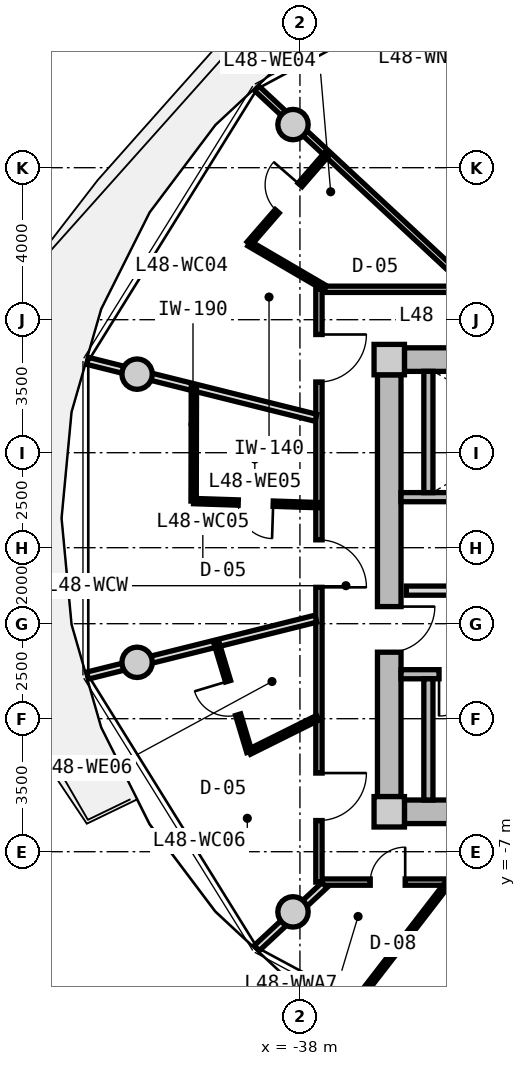
"""IFC4 building model, lengths in metres.
Left out: names, types, materials, properties, quantities, classifications, styles, units other than length and angle.
Written with IfcOpenShell. Run it as: python <this file> out.ifc"""

import sys

from ifc_helpers import new_model, si_unit, direction, frame, frame_2d, origin, origin_2d, place, context, subcontext, project, spatial, rectangle, circle, extrude, source, transform, mapped, element, fill, save


model = new_model("IFC4")
c1 = context("Model", 3, precision=1e-05, world=origin(), true_north=direction((0.0, 1.0)))
c2 = subcontext(c1, "Body", "Model", "MODEL_VIEW")
j1 = project(units=[si_unit("LENGTHUNIT", "METRE"), si_unit("PLANEANGLEUNIT", "RADIAN")], contexts=[c1])
p1 = place(None, origin())
s1 = spatial("IfcSite", under=j1, at=p1, CompositionType="ELEMENT")
p2 = place(p1, origin())
s2 = spatial("IfcBuilding", under=s1, at=p2, CompositionType="ELEMENT")
p3 = place(p2, frame((0.0, 0.0, 155.65)))
s3 = spatial("IfcBuildingStorey", under=s2, at=p3, CompositionType="ELEMENT", Elevation=155.65)
m1 = source(origin(), c2, "Body", "SweptSolid", [
    extrude(rectangle(XDim=0.8, YDim=0.8, at=origin_2d()), origin(), (0.0, 0.0, 1.0), 3.05),
])
for number, where, z_axis, x_axis in (
    (1, (-35.65, -5.95, 0.0), (0.0, 0.0, 1.0), (1.0, 0.0, 0.0)),
    (2, (-35.65, 5.95, 0.0), (0.0, 0.0, 1.0), (1.0, 0.0, 0.0)),
):
    element("IfcColumn", number, at=place(p3, frame(where, z_axis=z_axis, x_axis=x_axis)), inside=s3, PredefinedType="COLUMN", context=c2, shape_type="MappedRepresentation", body=[
        mapped(m1, transform((0.0, 0.0, 0.0), x_axis=(1.0, 0.0, 0.0), y_axis=(0.0, 1.0, 0.0), z_axis=(0.0, 0.0, 1.0), scale=1.0)),
    ])
m2 = source(origin(), c2, "Body", "SweptSolid", [
    extrude(rectangle(XDim=14.5, YDim=0.62, at=frame_2d((7.25, 0.0))), origin(), (0.0, 0.0, 1.0), 2.81),
])
for number, where, z_axis, x_axis in (
    (3, (-35.25, 5.95, 0.0), (0.0, 0.0, 1.0), (1.0, 0.0, 0.0)),
    (4, (-20.75, -5.95, 0.0), (0.0, 0.0, 1.0), (-1.0, 0.0, 0.0)),
):
    element("IfcWall", number, at=place(p3, frame(where, z_axis=z_axis, x_axis=x_axis)), inside=s3, PredefinedType="SHEAR", context=c2, shape_type="MappedRepresentation", body=[
        mapped(m2, transform((0.0, 0.0, 0.0), x_axis=(1.0, 0.0, 0.0), y_axis=(0.0, 1.0, 0.0), z_axis=(0.0, 0.0, 1.0), scale=1.0)),
    ])
m3 = source(origin(), c2, "Body", "SweptSolid", [
    extrude(rectangle(XDim=11.1, YDim=0.62, at=frame_2d((5.55, 0.0))), origin(), (0.0, 0.0, 1.0), 2.81),
])
p4 = place(p3, frame((-35.65, -5.55, 0.0), z_axis=(0.0, 0.0, 1.0), x_axis=(0.0, 1.0, 0.0)))
e5 = element("IfcWall", 5, at=p4, inside=s3, PredefinedType="SHEAR", context=c2, shape_type="MappedRepresentation", body=[
    mapped(m3, transform((0.0, 0.0, 0.0), x_axis=(1.0, 0.0, 0.0), y_axis=(0.0, 1.0, 0.0), z_axis=(0.0, 0.0, 1.0), scale=1.0)),
])
p5 = place(p4, frame((3.8, 0.0, 0.0)))
e6 = element("IfcOpeningElement", 6, at=p5, cuts=e5, PredefinedType="OPENING", context=c2, shape_type="SweptSolid", body=[
    extrude(rectangle(XDim=1.2, YDim=2.15, at=frame_2d((0.6, 1.075))), frame((0.0, 0.32, 0.0), z_axis=(0.0, -1.0, 0.0), x_axis=(1.0, 0.0, 0.0)), (0.0, 0.0, 1.0), 0.64),
])
m4 = source(origin(), c2, "Body", "SweptSolid", [
    extrude(circle(Radius=0.4, at=origin_2d()), origin(), (0.0, 0.0, 1.0), 3.05),
])
for number, where, z_axis, x_axis in (
    (7, (-38.183, 12.135, 0.0), (0.0, 0.0, 1.0), (1.0, 0.0, 0.0)),
    (8, (-42.285, 5.567, 0.0), (0.0, 0.0, 1.0), (1.0, 0.0, 0.0)),
    (9, (-42.285, -2.016, 0.0), (0.0, 0.0, 1.0), (1.0, 0.0, 0.0)),
    (10, (-38.183, -8.584, 0.0), (0.0, 0.0, 1.0), (1.0, 0.0, 0.0)),
):
    element("IfcColumn", number, at=place(p3, frame(where, z_axis=z_axis, x_axis=x_axis)), inside=s3, PredefinedType="COLUMN", context=c2, shape_type="MappedRepresentation", body=[
        mapped(m4, transform((0.0, 0.0, 0.0), x_axis=(1.0, 0.0, 0.0), y_axis=(0.0, 1.0, 0.0), z_axis=(0.0, 0.0, 1.0), scale=1.0)),
    ])
m5 = source(origin(), c2, "Body", "SweptSolid", [
    extrude(rectangle(XDim=7.88, YDim=0.24, at=frame_2d((3.94, 0.0))), origin(), (0.0, 0.0, 1.0), 2.81),
])
p6 = place(p3, frame((-35.34, 2.33, 0.0), z_axis=(0.0, 0.0, 1.0), x_axis=(1.0, 0.0, 0.0)))
e11 = element("IfcWall", 11, at=p6, inside=s3, PredefinedType="PARTITIONING", context=c2, shape_type="MappedRepresentation", body=[
    mapped(m5, transform((0.0, 0.0, 0.0), x_axis=(1.0, 0.0, 0.0), y_axis=(0.0, 1.0, 0.0), z_axis=(0.0, 0.0, 1.0), scale=1.0)),
])
m6 = source(origin(), c2, "Body", "SweptSolid", [
    extrude(rectangle(XDim=3.19, YDim=0.24, at=frame_2d((1.595, 0.0))), origin(), (0.0, 0.0, 1.0), 2.81),
])
p7 = place(p3, frame((-34.62, 2.45, 0.0), z_axis=(0.0, 0.0, 1.0), x_axis=(0.0, 1.0, 0.0)))
e12 = element("IfcWall", 12, at=p7, inside=s3, PredefinedType="PARTITIONING", context=c2, shape_type="MappedRepresentation", body=[
    mapped(m6, transform((0.0, 0.0, 0.0), x_axis=(1.0, 0.0, 0.0), y_axis=(0.0, 1.0, 0.0), z_axis=(0.0, 0.0, 1.0), scale=1.0)),
])
p8 = place(p3, frame((-35.34, -2.33, 0.0), z_axis=(0.0, 0.0, 1.0), x_axis=(1.0, 0.0, 0.0)))
e13 = element("IfcWall", 13, at=p8, inside=s3, PredefinedType="PARTITIONING", context=c2, shape_type="MappedRepresentation", body=[
    mapped(m5, transform((0.0, 0.0, 0.0), x_axis=(1.0, 0.0, 0.0), y_axis=(0.0, 1.0, 0.0), z_axis=(0.0, 0.0, 1.0), scale=1.0)),
])
p9 = place(p8, frame((1.0, 0.0, 0.0)))
e14 = element("IfcOpeningElement", 14, at=p9, cuts=e13, PredefinedType="OPENING", context=c2, shape_type="SweptSolid", body=[
    extrude(rectangle(XDim=1.1, YDim=2.15, at=frame_2d((0.55, 1.075))), frame((0.0, 0.13, 0.0), z_axis=(0.0, -1.0, 0.0), x_axis=(1.0, 0.0, 0.0)), (0.0, 0.0, 1.0), 0.26),
])
p10 = place(p3, frame((-34.62, -5.64, 0.0), z_axis=(0.0, 0.0, 1.0), x_axis=(0.0, 1.0, 0.0)))
e15 = element("IfcWall", 15, at=p10, inside=s3, PredefinedType="PARTITIONING", context=c2, shape_type="MappedRepresentation", body=[
    mapped(m6, transform((0.0, 0.0, 0.0), x_axis=(1.0, 0.0, 0.0), y_axis=(0.0, 1.0, 0.0), z_axis=(0.0, 0.0, 1.0), scale=1.0)),
])
m7 = source(origin(), c2, "Body", "SweptSolid", [
    extrude(rectangle(XDim=7.62, YDim=0.24, at=frame_2d((3.81, 0.0))), origin(), (0.0, 0.0, 1.0), 2.795),
])
p11 = place(p3, frame((-35.2, -0.13, 0.0), z_axis=(0.0, 0.0, 1.0), x_axis=(1.0, 0.0, 0.0)))
e16 = element("IfcWall", 16, at=p11, inside=s3, PredefinedType="PARTITIONING", context=c2, shape_type="MappedRepresentation", body=[
    mapped(m7, transform((0.0, 0.0, 0.0), x_axis=(1.0, 0.0, 0.0), y_axis=(0.0, 1.0, 0.0), z_axis=(0.0, 0.0, 1.0), scale=1.0)),
])
p12 = place(p11, frame((6.22, 0.0, 0.0)))
e17 = element("IfcOpeningElement", 17, at=p12, cuts=e16, PredefinedType="OPENING", context=c2, shape_type="SweptSolid", body=[
    extrude(rectangle(XDim=1.0, YDim=2.1, at=frame_2d((0.5, 1.05))), frame((0.0, 0.13, 0.0), z_axis=(0.0, -1.0, 0.0), x_axis=(1.0, 0.0, 0.0)), (0.0, 0.0, 1.0), 0.26),
])
p13 = place(p11, frame((2.4, 0.0, 0.0)))
e18 = element("IfcOpeningElement", 18, at=p13, cuts=e16, PredefinedType="OPENING", context=c2, shape_type="SweptSolid", body=[
    extrude(rectangle(XDim=1.0, YDim=2.1, at=frame_2d((0.5, 1.05))), frame((0.0, 0.13, 0.0), z_axis=(0.0, -1.0, 0.0), x_axis=(1.0, 0.0, 0.0)), (0.0, 0.0, 1.0), 0.26),
])
m8 = source(origin(), c2, "Body", "SweptSolid", [
    extrude(rectangle(XDim=8.6, YDim=0.165, at=frame_2d((4.3, 0.0))), origin(), (0.0, 0.0, 1.0), 2.795),
])
p14 = place(p3, frame((-37.5, 7.8, 0.0), z_axis=(0.0, 0.0, 1.0), x_axis=(1.0, 0.0, 0.0)))
e19 = element("IfcWall", 19, at=p14, inside=s3, PredefinedType="PARTITIONING", context=c2, shape_type="MappedRepresentation", body=[
    mapped(m8, transform((0.0, 0.0, 0.0), x_axis=(1.0, 0.0, 0.0), y_axis=(0.0, 1.0, 0.0), z_axis=(0.0, 0.0, 1.0), scale=1.0)),
])
p15 = place(p3, frame((-28.9, -7.8, 0.0), z_axis=(0.0, 0.0, 1.0), x_axis=(-1.0, 0.0, 0.0)))
e20 = element("IfcWall", 20, at=p15, inside=s3, PredefinedType="PARTITIONING", context=c2, shape_type="MappedRepresentation", body=[
    mapped(m8, transform((0.0, 0.0, 0.0), x_axis=(1.0, 0.0, 0.0), y_axis=(0.0, 1.0, 0.0), z_axis=(0.0, 0.0, 1.0), scale=1.0)),
])
p16 = place(p15, frame((6.33, 0.0, 0.0)))
e21 = element("IfcOpeningElement", 21, at=p16, cuts=e20, PredefinedType="OPENING", context=c2, shape_type="SweptSolid", body=[
    extrude(rectangle(XDim=0.92, YDim=2.1, at=frame_2d((0.46, 1.05))), frame((0.0, 0.093, 0.0), z_axis=(0.0, -1.0, 0.0), x_axis=(1.0, 0.0, 0.0)), (0.0, 0.0, 1.0), 0.185),
])
p17 = place(p15, frame((2.575, 0.0, 0.0)))
e22 = element("IfcOpeningElement", 22, at=p17, cuts=e20, PredefinedType="OPENING", context=c2, shape_type="SweptSolid", body=[
    extrude(rectangle(XDim=0.92, YDim=2.1, at=frame_2d((0.46, 1.05))), frame((0.0, 0.093, 0.0), z_axis=(0.0, -1.0, 0.0), x_axis=(1.0, 0.0, 0.0)), (0.0, 0.0, 1.0), 0.185),
])
m9 = source(origin(), c2, "Body", "SweptSolid", [
    extrude(rectangle(XDim=15.6, YDim=0.165, at=frame_2d((7.8, 0.0))), origin(), (0.0, 0.0, 1.0), 2.795),
])
p18 = place(p3, frame((-37.5, -7.8, 0.0), z_axis=(0.0, 0.0, 1.0), x_axis=(0.0, 1.0, 0.0)))
e23 = element("IfcWall", 23, at=p18, inside=s3, PredefinedType="PARTITIONING", context=c2, shape_type="MappedRepresentation", body=[
    mapped(m9, transform((0.0, 0.0, 0.0), x_axis=(1.0, 0.0, 0.0), y_axis=(0.0, 1.0, 0.0), z_axis=(0.0, 0.0, 1.0), scale=1.0)),
])
p19 = place(p18, frame((13.16, 0.0, 0.0)))
e24 = element("IfcOpeningElement", 24, at=p19, cuts=e23, PredefinedType="OPENING", context=c2, shape_type="SweptSolid", body=[
    extrude(rectangle(XDim=1.25, YDim=2.2, at=frame_2d((0.625, 1.1))), frame((0.0, 0.093, 0.0), z_axis=(0.0, -1.0, 0.0), x_axis=(1.0, 0.0, 0.0)), (0.0, 0.0, 1.0), 0.185),
])
p20 = place(p18, frame((7.757, 0.0, 0.0)))
e25 = element("IfcOpeningElement", 25, at=p20, cuts=e23, PredefinedType="OPENING", context=c2, shape_type="SweptSolid", body=[
    extrude(rectangle(XDim=1.25, YDim=2.2, at=frame_2d((0.625, 1.1))), frame((0.0, 0.093, 0.0), z_axis=(0.0, -1.0, 0.0), x_axis=(1.0, 0.0, 0.0)), (0.0, 0.0, 1.0), 0.185),
])
p21 = place(p18, frame((1.62, 0.0, 0.0)))
e26 = element("IfcOpeningElement", 26, at=p21, cuts=e23, PredefinedType="OPENING", context=c2, shape_type="SweptSolid", body=[
    extrude(rectangle(XDim=1.25, YDim=2.2, at=frame_2d((0.625, 1.1))), frame((0.0, 0.093, 0.0), z_axis=(0.0, -1.0, 0.0), x_axis=(1.0, 0.0, 0.0)), (0.0, 0.0, 1.0), 0.185),
])
m10 = source(origin(), c2, "Body", "SweptSolid", [
    extrude(rectangle(XDim=7.648, YDim=0.165, at=frame_2d((3.824, 0.0))), origin(), (0.0, 0.0, 1.0), 2.435),
])
p22 = place(p3, frame((-33.538, 7.88, 0.0), z_axis=(0.0, 0.0, 1.0), x_axis=(-0.732167856666, 0.681124239522, 0.0)))
e27 = element("IfcWall", 27, at=p22, inside=s3, PredefinedType="PARTITIONING", context=c2, shape_type="MappedRepresentation", body=[
    mapped(m10, transform((0.0, 0.0, 0.0), x_axis=(1.0, 0.0, 0.0), y_axis=(0.0, 1.0, 0.0), z_axis=(0.0, 0.0, 1.0), scale=1.0)),
])
m11 = source(origin(), c2, "Body", "SweptSolid", [
    extrude(rectangle(XDim=6.193, YDim=0.19, at=frame_2d((3.096, 0.0))), origin(), (0.0, 0.0, 1.0), 2.345),
])
p23 = place(p3, frame((-37.58, 4.419, 0.0), z_axis=(0.0, 0.0, 1.0), x_axis=(-0.970309243466, 0.241867674657, 0.0)))
e28 = element("IfcWall", 28, at=p23, inside=s3, PredefinedType="PARTITIONING", context=c2, shape_type="MappedRepresentation", body=[
    mapped(m11, transform((0.0, 0.0, 0.0), x_axis=(1.0, 0.0, 0.0), y_axis=(0.0, 1.0, 0.0), z_axis=(0.0, 0.0, 1.0), scale=1.0)),
])
m12 = source(origin(), c2, "Body", "SweptSolid", [
    extrude(rectangle(XDim=2.323, YDim=0.14, at=frame_2d((1.161, 0.0))), origin(), (0.0, 0.0, 1.0), 2.795),
])
p24 = place(p3, frame((-37.331, 7.83, 0.0), z_axis=(0.0, 0.0, 1.0), x_axis=(-0.863343994595, 0.504615841009, 0.0)))
e29 = element("IfcWall", 29, at=p24, inside=s3, PredefinedType="PARTITIONING", context=c2, shape_type="MappedRepresentation", body=[
    mapped(m12, transform((0.0, 0.0, 0.0), x_axis=(1.0, 0.0, 0.0), y_axis=(0.0, 1.0, 0.0), z_axis=(0.0, 0.0, 1.0), scale=1.0)),
])
m13 = source(origin(), c2, "Body", "SweptSolid", [
    extrude(rectangle(XDim=3.171, YDim=0.14, at=frame_2d((1.585, 0.0))), origin(), (0.0, 0.0, 1.0), 2.795),
])
p25 = place(p3, frame((-39.336, 9.002, 0.0), z_axis=(0.0, 0.0, 1.0), x_axis=(0.654953989592, 0.755668757801, 0.0)))
e30 = element("IfcWall", 30, at=p25, inside=s3, PredefinedType="PARTITIONING", context=c2, shape_type="MappedRepresentation", body=[
    mapped(m13, transform((0.0, 0.0, 0.0), x_axis=(1.0, 0.0, 0.0), y_axis=(0.0, 1.0, 0.0), z_axis=(0.0, 0.0, 1.0), scale=1.0)),
])
p26 = place(p25, frame((1.125, 0.0, 0.0)))
e31 = element("IfcOpeningElement", 31, at=p26, cuts=e30, PredefinedType="OPENING", context=c2, shape_type="SweptSolid", body=[
    extrude(rectangle(XDim=0.92, YDim=2.1, at=frame_2d((0.46, 1.05))), frame((0.0, 0.08, 0.0), z_axis=(0.0, -1.0, 0.0), x_axis=(1.0, 0.0, 0.0)), (0.0, 0.0, 1.0), 0.16),
])
p27 = place(p3, frame((-37.58, -0.868, 0.0), z_axis=(0.0, 0.0, 1.0), x_axis=(-0.970309243466, -0.241867674657, 0.0)))
e32 = element("IfcWall", 32, at=p27, inside=s3, PredefinedType="PARTITIONING", context=c2, shape_type="MappedRepresentation", body=[
    mapped(m11, transform((0.0, 0.0, 0.0), x_axis=(1.0, 0.0, 0.0), y_axis=(0.0, 1.0, 0.0), z_axis=(0.0, 0.0, 1.0), scale=1.0)),
])
m14 = source(origin(), c2, "Body", "SweptSolid", [
    extrude(rectangle(XDim=3.269, YDim=0.14, at=frame_2d((1.635, 0.0))), origin(), (0.0, 0.0, 1.0), 2.795),
])
p28 = place(p3, frame((-37.53, 2.12, 0.0), z_axis=(0.0, 0.0, 1.0), x_axis=(-0.99946494589, 0.032708132569, 0.0)))
e33 = element("IfcWall", 33, at=p28, inside=s3, PredefinedType="PARTITIONING", context=c2, shape_type="MappedRepresentation", body=[
    mapped(m14, transform((0.0, 0.0, 0.0), x_axis=(1.0, 0.0, 0.0), y_axis=(0.0, 1.0, 0.0), z_axis=(0.0, 0.0, 1.0), scale=1.0)),
])
p29 = place(p28, frame((1.175, 0.0, 0.0)))
e34 = element("IfcOpeningElement", 34, at=p29, cuts=e33, PredefinedType="OPENING", context=c2, shape_type="SweptSolid", body=[
    extrude(rectangle(XDim=0.92, YDim=2.1, at=frame_2d((0.46, 1.05))), frame((0.0, 0.08, 0.0), z_axis=(0.0, -1.0, 0.0), x_axis=(1.0, 0.0, 0.0)), (0.0, 0.0, 1.0), 0.16),
])
m15 = source(origin(), c2, "Body", "SweptSolid", [
    extrude(rectangle(XDim=3.012, YDim=0.14, at=frame_2d((1.506, 0.0))), origin(), (0.0, 0.0, 1.0), 2.795),
])
p30 = place(p3, frame((-40.798, 2.227, 0.0), z_axis=(0.0, 0.0, 1.0), x_axis=(0.00226958968, 0.999997424478, 0.0)))
e35 = element("IfcWall", 35, at=p30, inside=s3, PredefinedType="PARTITIONING", context=c2, shape_type="MappedRepresentation", body=[
    mapped(m15, transform((0.0, 0.0, 0.0), x_axis=(1.0, 0.0, 0.0), y_axis=(0.0, 1.0, 0.0), z_axis=(0.0, 0.0, 1.0), scale=1.0)),
])
m16 = source(origin(), c2, "Body", "SweptSolid", [
    extrude(rectangle(XDim=2.435, YDim=0.19, at=frame_2d((1.217, 0.0))), origin(), (0.0, 0.0, 1.0), 2.345),
])
p31 = place(p3, frame((-37.354, -7.88, 0.0), z_axis=(0.0, 0.0, 1.0), x_axis=(-0.732164643118, -0.681127693878, 0.0)))
e36 = element("IfcWall", 36, at=p31, inside=s3, PredefinedType="PARTITIONING", context=c2, shape_type="MappedRepresentation", body=[
    mapped(m16, transform((0.0, 0.0, 0.0), x_axis=(1.0, 0.0, 0.0), y_axis=(0.0, 1.0, 0.0), z_axis=(0.0, 0.0, 1.0), scale=1.0)),
])
m17 = source(origin(), c2, "Body", "SweptSolid", [
    extrude(rectangle(XDim=2.013, YDim=0.14, at=frame_2d((1.006, 0.0))), origin(), (0.0, 0.0, 1.0), 2.795),
])
p32 = place(p3, frame((-37.53, -3.476, 0.0), z_axis=(0.0, 0.0, 1.0), x_axis=(-0.895347078862, -0.445369069843, 0.0)))
e37 = element("IfcWall", 37, at=p32, inside=s3, PredefinedType="PARTITIONING", context=c2, shape_type="MappedRepresentation", body=[
    mapped(m17, transform((0.0, 0.0, 0.0), x_axis=(1.0, 0.0, 0.0), y_axis=(0.0, 1.0, 0.0), z_axis=(0.0, 0.0, 1.0), scale=1.0)),
])
m18 = source(origin(), c2, "Body", "SweptSolid", [
    extrude(rectangle(XDim=2.961, YDim=0.14, at=frame_2d((1.48, 0.0))), origin(), (0.0, 0.0, 1.0), 2.795),
])
p33 = place(p3, frame((-39.332, -4.372, 0.0), z_axis=(0.0, 0.0, 1.0), x_axis=(-0.288391510046, 0.957512577951, 0.0)))
e38 = element("IfcWall", 38, at=p33, inside=s3, PredefinedType="PARTITIONING", context=c2, shape_type="MappedRepresentation", body=[
    mapped(m18, transform((0.0, 0.0, 0.0), x_axis=(1.0, 0.0, 0.0), y_axis=(0.0, 1.0, 0.0), z_axis=(0.0, 0.0, 1.0), scale=1.0)),
])
p34 = place(p33, frame((1.021, 0.0, 0.0)))
e39 = element("IfcOpeningElement", 39, at=p34, cuts=e38, PredefinedType="OPENING", context=c2, shape_type="SweptSolid", body=[
    extrude(rectangle(XDim=0.92, YDim=2.1, at=frame_2d((0.46, 1.05))), frame((0.0, 0.08, 0.0), z_axis=(0.0, -1.0, 0.0), x_axis=(1.0, 0.0, 0.0)), (0.0, 0.0, 1.0), 0.16),
])
m19 = source(origin(), c2, "Body", "SweptSolid", [
    extrude(rectangle(XDim=3.937, YDim=0.14, at=frame_2d((1.968, 0.0))), origin(), (0.0, 0.0, 1.0), 2.795),
])
p35 = place(p3, frame((-34.11, -7.83, 0.0), z_axis=(0.0, 0.0, 1.0), x_axis=(-0.611016723561, -0.791617687731, 0.0)))
e40 = element("IfcWall", 40, at=p35, inside=s3, PredefinedType="PARTITIONING", context=c2, shape_type="MappedRepresentation", body=[
    mapped(m19, transform((0.0, 0.0, 0.0), x_axis=(1.0, 0.0, 0.0), y_axis=(0.0, 1.0, 0.0), z_axis=(0.0, 0.0, 1.0), scale=1.0)),
])
m20 = source(origin(), c2, "Body", "SweptSolid", [
    extrude(rectangle(XDim=1.1, YDim=2.15, at=frame_2d((0.55, 1.075))), frame((0.0, 0.025, 0.0), z_axis=(0.0, -1.0, 0.0), x_axis=(1.0, 0.0, 0.0)), (0.0, 0.0, 1.0), 0.05),
])
p36 = place(p9, frame((1.1, 0.0, 0.0), z_axis=(0.0, 0.0, 1.0), x_axis=(-1.0, 0.0, 0.0)))
e41 = element("IfcDoor", 41, at=p36, inside=s3, OperationType="SINGLE_SWING_RIGHT", PredefinedType="DOOR", context=c2, shape_type="MappedRepresentation", body=[
    mapped(m20, transform((0.0, 0.0, 0.0), x_axis=(1.0, 0.0, 0.0), y_axis=(0.0, 1.0, 0.0), z_axis=(0.0, 0.0, 1.0), scale=1.0)),
])
fill(e14, e41)
m21 = source(origin(), c2, "Body", "SweptSolid", [
    extrude(rectangle(XDim=1.2, YDim=2.15, at=frame_2d((0.6, 1.075))), frame((0.0, 0.025, 0.0), z_axis=(0.0, -1.0, 0.0), x_axis=(1.0, 0.0, 0.0)), (0.0, 0.0, 1.0), 0.05),
])
p37 = place(p5, frame((1.2, 0.0, 0.0), z_axis=(0.0, 0.0, 1.0), x_axis=(-1.0, 0.0, 0.0)))
e42 = element("IfcDoor", 42, at=p37, inside=s3, OperationType="SINGLE_SWING_LEFT", PredefinedType="DOOR", context=c2, shape_type="MappedRepresentation", body=[
    mapped(m21, transform((0.0, 0.0, 0.0), x_axis=(1.0, 0.0, 0.0), y_axis=(0.0, 1.0, 0.0), z_axis=(0.0, 0.0, 1.0), scale=1.0)),
])
fill(e6, e42)
m22 = source(origin(), c2, "Body", "SweptSolid", [
    extrude(rectangle(XDim=1.25, YDim=2.2, at=frame_2d((0.625, 1.1))), frame((0.0, 0.025, 0.0), z_axis=(0.0, -1.0, 0.0), x_axis=(1.0, 0.0, 0.0)), (0.0, 0.0, 1.0), 0.05),
])
p38 = place(p19, frame((1.25, 0.0, 0.0), z_axis=(0.0, 0.0, 1.0), x_axis=(-1.0, 0.0, 0.0)))
e43 = element("IfcDoor", 43, at=p38, inside=s3, OperationType="SINGLE_SWING_LEFT", PredefinedType="DOOR", context=c2, shape_type="MappedRepresentation", body=[
    mapped(m22, transform((0.0, 0.0, 0.0), x_axis=(1.0, 0.0, 0.0), y_axis=(0.0, 1.0, 0.0), z_axis=(0.0, 0.0, 1.0), scale=1.0)),
])
fill(e24, e43)
m23 = source(origin(), c2, "Body", "SweptSolid", [
    extrude(rectangle(XDim=0.92, YDim=2.1, at=frame_2d((0.46, 1.05))), frame((0.0, 0.025, 0.0), z_axis=(0.0, -1.0, 0.0), x_axis=(1.0, 0.0, 0.0)), (0.0, 0.0, 1.0), 0.05),
])
p39 = place(p26, origin())
e44 = element("IfcDoor", 44, at=p39, inside=s3, OperationType="SINGLE_SWING_RIGHT", PredefinedType="DOOR", context=c2, shape_type="MappedRepresentation", body=[
    mapped(m23, transform((0.0, 0.0, 0.0), x_axis=(1.0, 0.0, 0.0), y_axis=(0.0, 1.0, 0.0), z_axis=(0.0, 0.0, 1.0), scale=1.0)),
])
fill(e31, e44)
p40 = place(p20, frame((1.25, 0.0, 0.0), z_axis=(0.0, 0.0, 1.0), x_axis=(-1.0, 0.0, 0.0)))
e45 = element("IfcDoor", 45, at=p40, inside=s3, OperationType="SINGLE_SWING_RIGHT", PredefinedType="DOOR", context=c2, shape_type="MappedRepresentation", body=[
    mapped(m22, transform((0.0, 0.0, 0.0), x_axis=(1.0, 0.0, 0.0), y_axis=(0.0, 1.0, 0.0), z_axis=(0.0, 0.0, 1.0), scale=1.0)),
])
fill(e25, e45)
p41 = place(p29, origin())
e46 = element("IfcDoor", 46, at=p41, inside=s3, OperationType="SINGLE_SWING_LEFT", PredefinedType="DOOR", context=c2, shape_type="MappedRepresentation", body=[
    mapped(m23, transform((0.0, 0.0, 0.0), x_axis=(1.0, 0.0, 0.0), y_axis=(0.0, 1.0, 0.0), z_axis=(0.0, 0.0, 1.0), scale=1.0)),
])
fill(e34, e46)
p42 = place(p21, frame((1.25, 0.0, 0.0), z_axis=(0.0, 0.0, 1.0), x_axis=(-1.0, 0.0, 0.0)))
e47 = element("IfcDoor", 47, at=p42, inside=s3, OperationType="SINGLE_SWING_LEFT", PredefinedType="DOOR", context=c2, shape_type="MappedRepresentation", body=[
    mapped(m22, transform((0.0, 0.0, 0.0), x_axis=(1.0, 0.0, 0.0), y_axis=(0.0, 1.0, 0.0), z_axis=(0.0, 0.0, 1.0), scale=1.0)),
])
fill(e26, e47)
p43 = place(p34, origin())
e48 = element("IfcDoor", 48, at=p43, inside=s3, OperationType="SINGLE_SWING_RIGHT", PredefinedType="DOOR", context=c2, shape_type="MappedRepresentation", body=[
    mapped(m23, transform((0.0, 0.0, 0.0), x_axis=(1.0, 0.0, 0.0), y_axis=(0.0, 1.0, 0.0), z_axis=(0.0, 0.0, 1.0), scale=1.0)),
])
fill(e39, e48)
p44 = place(p16, frame((0.92, 0.0, 0.0), z_axis=(0.0, 0.0, 1.0), x_axis=(-1.0, 0.0, 0.0)))
e49 = element("IfcDoor", 49, at=p44, inside=s3, OperationType="SINGLE_SWING_RIGHT", PredefinedType="DOOR", context=c2, shape_type="MappedRepresentation", body=[
    mapped(m23, transform((0.0, 0.0, 0.0), x_axis=(1.0, 0.0, 0.0), y_axis=(0.0, 1.0, 0.0), z_axis=(0.0, 0.0, 1.0), scale=1.0)),
])
fill(e21, e49)
save(model, sys.argv[1])
